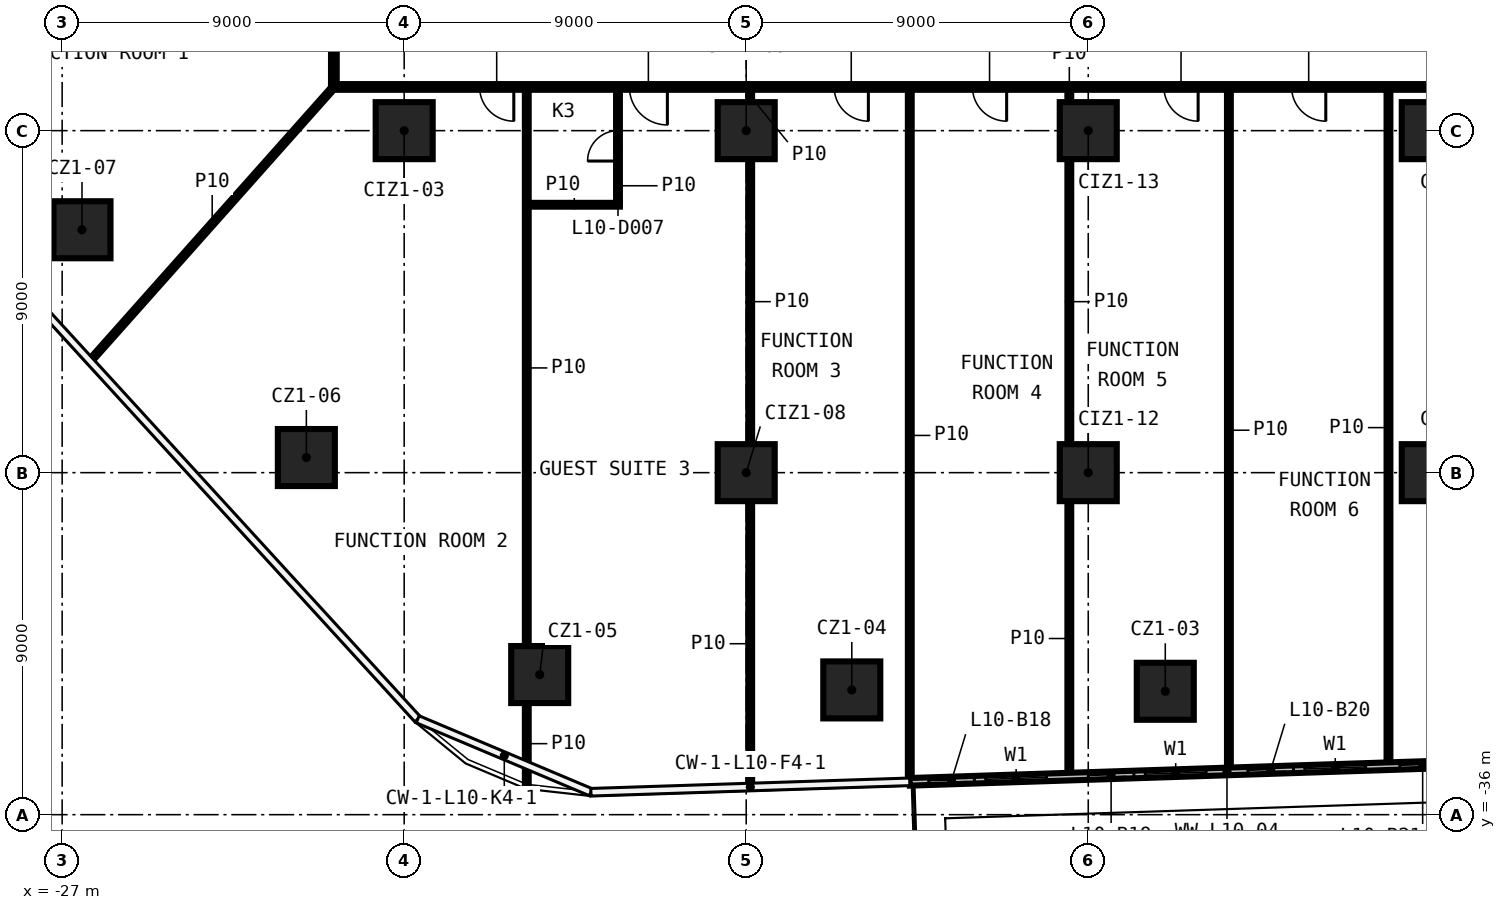
"""IFC4 building model, lengths in metres.
Left out: names, types, materials, properties, quantities, classifications, styles, units other than length and angle.
Written with IfcOpenShell. Run it as: python <this file> out.ifc"""

import sys

from ifc_helpers import new_model, si_unit, direction, frame, frame_2d, origin, origin_2d, place, context, subcontext, project, spatial, rectangle, extrude, element, fill, save


model = new_model("IFC4")
c1 = context("Model", 3, precision=1e-05, world=origin(), true_north=direction((0.0, 1.0)))
c2 = subcontext(c1, "Body", "Model", "MODEL_VIEW")
j1 = project(units=[si_unit("LENGTHUNIT", "METRE"), si_unit("PLANEANGLEUNIT", "RADIAN")], contexts=[c1])
p1 = place(None, origin())
s1 = spatial("IfcSite", under=j1, at=p1, CompositionType="ELEMENT")
p2 = place(p1, origin())
s2 = spatial("IfcBuilding", under=s1, at=p2, CompositionType="ELEMENT")
p3 = place(p2, frame((0.0, 0.0, 58.8)))
s3 = spatial("IfcBuildingStorey", under=s2, at=p3, CompositionType="ELEMENT", Elevation=58.8)
for number, where, z_axis, x_axis in (
    (1, (2.027, -32.753, 0.0), (0.0, 0.0, 1.0), (1.0, 0.0, 0.0)),
    (2, (-6.222, -32.717, 0.0), (0.0, 0.0, 1.0), (1.0, 0.0, 0.0)),
    (3, (-14.434, -32.313, 0.0), (0.0, 0.0, 1.0), (1.0, 0.0, 0.0)),
    (4, (-20.574, -26.602, 0.0), (0.0, 0.0, 1.0), (1.0, 0.0, 0.0)),
    (5, (-26.478, -20.608, 0.0), (0.0, 0.0, 1.0), (1.0, 0.0, 0.0)),
    (6, (-18.0, -18.0, 0.0), (0.0, 0.0, 1.0), (1.0, 0.0, 0.0)),
    (7, (-9.0, -27.0, 0.0), (0.0, 0.0, 1.0), (1.0, 0.0, 0.0)),
    (8, (-9.0, -18.0, 0.0), (0.0, 0.0, 1.0), (1.0, 0.0, 0.0)),
    (9, (0.0, -27.0, 0.0), (0.0, 0.0, 1.0), (1.0, 0.0, 0.0)),
    (10, (0.0, -18.0, 0.0), (0.0, 0.0, 1.0), (1.0, 0.0, 0.0)),
    (11, (9.0, -27.0, 0.0), (0.0, 0.0, 1.0), (1.0, 0.0, 0.0)),
    (12, (9.0, -18.0, 0.0), (0.0, 0.0, 1.0), (1.0, 0.0, 0.0)),
):
    element("IfcColumn", number, at=place(p3, frame(where, z_axis=z_axis, x_axis=x_axis)), inside=s3, PredefinedType="COLUMN", context=c2, shape_type="SweptSolid", body=[
        extrude(rectangle(XDim=1.5, YDim=1.5, at=origin_2d()), origin(), (0.0, 0.0, 1.0), 3.3),
    ])
p4 = place(p3, frame((-14.724, -19.95, 0.0), z_axis=(0.0, 0.0, 1.0), x_axis=(1.0, 0.0, 0.0)))
e13 = element("IfcWall", 13, at=p4, inside=s3, PredefinedType="PARTITIONING", context=c2, shape_type="SweptSolid", body=[
    extrude(rectangle(XDim=2.4, YDim=0.1, at=frame_2d((1.2, 0.0))), origin(), (0.0, 0.0, 1.0), 3.3),
])
p5 = place(p3, frame((19.925, -16.85, 0.0), z_axis=(0.0, 0.0, 1.0), x_axis=(-1.0, 0.0, 0.0)))
e14 = element("IfcWall", 14, at=p5, inside=s3, PredefinedType="PARTITIONING", context=c2, shape_type="SweptSolid", body=[
    extrude(rectangle(XDim=39.85, YDim=0.15, at=frame_2d((19.925, 0.0))), origin(), (0.0, 0.0, 1.0), 3.3),
])
p6 = place(p5, frame((35.041, 0.0, 0.0)))
e15 = element("IfcOpeningElement", 15, at=p6, cuts=e14, PredefinedType="OPENING", context=c2, shape_type="SweptSolid", body=[
    extrude(rectangle(XDim=0.9, YDim=2.1, at=frame_2d((0.45, 1.05))), frame((0.0, 0.085, 0.0), z_axis=(0.0, -1.0, 0.0), x_axis=(1.0, 0.0, 0.0)), (0.0, 0.0, 1.0), 0.17),
])
p7 = place(p5, frame((31.0, 0.0, 0.0)))
e16 = element("IfcOpeningElement", 16, at=p7, cuts=e14, PredefinedType="OPENING", context=c2, shape_type="SweptSolid", body=[
    extrude(rectangle(XDim=1.0, YDim=2.1, at=frame_2d((0.5, 1.05))), frame((0.0, 0.085, 0.0), z_axis=(0.0, -1.0, 0.0), x_axis=(1.0, 0.0, 0.0)), (0.0, 0.0, 1.0), 0.17),
])
p8 = place(p5, frame((25.711, 0.0, 0.0)))
e17 = element("IfcOpeningElement", 17, at=p8, cuts=e14, PredefinedType="OPENING", context=c2, shape_type="SweptSolid", body=[
    extrude(rectangle(XDim=0.9, YDim=2.1, at=frame_2d((0.45, 1.05))), frame((0.0, 0.085, 0.0), z_axis=(0.0, -1.0, 0.0), x_axis=(1.0, 0.0, 0.0)), (0.0, 0.0, 1.0), 0.17),
])
p9 = place(p5, frame((22.072, 0.0, 0.0)))
e18 = element("IfcOpeningElement", 18, at=p9, cuts=e14, PredefinedType="OPENING", context=c2, shape_type="SweptSolid", body=[
    extrude(rectangle(XDim=0.9, YDim=2.1, at=frame_2d((0.45, 1.05))), frame((0.0, 0.085, 0.0), z_axis=(0.0, -1.0, 0.0), x_axis=(1.0, 0.0, 0.0)), (0.0, 0.0, 1.0), 0.17),
])
p10 = place(p5, frame((17.034, 0.0, 0.0)))
e19 = element("IfcOpeningElement", 19, at=p10, cuts=e14, PredefinedType="OPENING", context=c2, shape_type="SweptSolid", body=[
    extrude(rectangle(XDim=0.9, YDim=2.1, at=frame_2d((0.45, 1.05))), frame((0.0, 0.085, 0.0), z_axis=(0.0, -1.0, 0.0), x_axis=(1.0, 0.0, 0.0)), (0.0, 0.0, 1.0), 0.17),
])
p11 = place(p5, frame((13.675, 0.0, 0.0)))
e20 = element("IfcOpeningElement", 20, at=p11, cuts=e14, PredefinedType="OPENING", context=c2, shape_type="SweptSolid", body=[
    extrude(rectangle(XDim=0.9, YDim=2.1, at=frame_2d((0.45, 1.05))), frame((0.0, 0.085, 0.0), z_axis=(0.0, -1.0, 0.0), x_axis=(1.0, 0.0, 0.0)), (0.0, 0.0, 1.0), 0.17),
])
p12 = place(p5, frame((4.031, 0.0, 0.0)))
e21 = element("IfcOpeningElement", 21, at=p12, cuts=e14, PredefinedType="OPENING", context=c2, shape_type="SweptSolid", body=[
    extrude(rectangle(XDim=1.0, YDim=2.1, at=frame_2d((0.5, 1.05))), frame((0.0, 0.085, 0.0), z_axis=(0.0, -1.0, 0.0), x_axis=(1.0, 0.0, 0.0)), (0.0, 0.0, 1.0), 0.17),
])
p13 = place(p3, frame((-26.253, -24.05, 0.0), z_axis=(0.0, 0.0, 1.0), x_axis=(0.66458555916, 0.747212175059, 0.0)))
e22 = element("IfcWall", 22, at=p13, inside=s3, PredefinedType="PARTITIONING", context=c2, shape_type="SweptSolid", body=[
    extrude(rectangle(XDim=9.635, YDim=0.1, at=frame_2d((4.818, 0.0))), origin(), (0.0, 0.0, 1.0), 3.3),
])
p14 = place(p3, frame((7.9, -34.704, 0.0), z_axis=(0.0, 0.0, 1.0), x_axis=(0.0, 1.0, 0.0)))
e23 = element("IfcWall", 23, at=p14, inside=s3, PredefinedType="PARTITIONING", context=c2, shape_type="SweptSolid", body=[
    extrude(rectangle(XDim=17.779, YDim=0.1, at=frame_2d((8.89, 0.0))), origin(), (0.0, 0.0, 1.0), 3.3),
])
p15 = place(p3, frame((3.701, -34.842, 0.0), z_axis=(0.0, 0.0, 1.0), x_axis=(0.0, 1.0, 0.0)))
e24 = element("IfcWall", 24, at=p15, inside=s3, PredefinedType="PARTITIONING", context=c2, shape_type="SweptSolid", body=[
    extrude(rectangle(XDim=17.917, YDim=0.1, at=frame_2d((8.958, 0.0))), origin(), (0.0, 0.0, 1.0), 3.3),
])
p16 = place(p3, frame((-0.498, -34.979, 0.0), z_axis=(0.0, 0.0, 1.0), x_axis=(0.0, 1.0, 0.0)))
e25 = element("IfcWall", 25, at=p16, inside=s3, PredefinedType="PARTITIONING", context=c2, shape_type="SweptSolid", body=[
    extrude(rectangle(XDim=7.229, YDim=0.1, at=frame_2d((3.614, 0.0))), origin(), (0.0, 0.0, 1.0), 3.3),
])
p17 = place(p3, frame((-0.498, -26.25, 0.0), z_axis=(0.0, 0.0, 1.0), x_axis=(0.0, 1.0, 0.0)))
e26 = element("IfcWall", 26, at=p17, inside=s3, PredefinedType="PARTITIONING", context=c2, shape_type="SweptSolid", body=[
    extrude(rectangle(XDim=7.5, YDim=0.1, at=frame_2d((3.75, 0.0))), origin(), (0.0, 0.0, 1.0), 3.3),
])
p18 = place(p3, frame((-0.498, -17.25, 0.0), z_axis=(0.0, 0.0, 1.0), x_axis=(0.0, 1.0, 0.0)))
e27 = element("IfcWall", 27, at=p18, inside=s3, PredefinedType="PARTITIONING", context=c2, shape_type="SweptSolid", body=[
    extrude(rectangle(XDim=0.325, YDim=0.1, at=frame_2d((0.163, 0.0))), origin(), (0.0, 0.0, 1.0), 3.3),
])
p19 = place(p3, frame((-4.696, -35.116, 0.0), z_axis=(0.0, 0.0, 1.0), x_axis=(0.0, 1.0, 0.0)))
e28 = element("IfcWall", 28, at=p19, inside=s3, PredefinedType="PARTITIONING", context=c2, shape_type="SweptSolid", body=[
    extrude(rectangle(XDim=18.191, YDim=0.1, at=frame_2d((9.095, 0.0))), origin(), (0.0, 0.0, 1.0), 3.3),
])
p20 = place(p3, frame((-8.895, -35.253, 0.0), z_axis=(0.0, 0.0, 1.0), x_axis=(0.0, 1.0, 0.0)))
e29 = element("IfcWall", 29, at=p20, inside=s3, PredefinedType="PARTITIONING", context=c2, shape_type="SweptSolid", body=[
    extrude(rectangle(XDim=7.503, YDim=0.1, at=frame_2d((3.751, 0.0))), origin(), (0.0, 0.0, 1.0), 3.3),
])
p21 = place(p3, frame((-8.895, -26.25, 0.0), z_axis=(0.0, 0.0, 1.0), x_axis=(0.0, 1.0, 0.0)))
e30 = element("IfcWall", 30, at=p21, inside=s3, PredefinedType="PARTITIONING", context=c2, shape_type="SweptSolid", body=[
    extrude(rectangle(XDim=7.5, YDim=0.1, at=frame_2d((3.75, 0.0))), origin(), (0.0, 0.0, 1.0), 3.3),
])
p22 = place(p3, frame((-8.895, -17.25, 0.0), z_axis=(0.0, 0.0, 1.0), x_axis=(0.0, 1.0, 0.0)))
e31 = element("IfcWall", 31, at=p22, inside=s3, PredefinedType="PARTITIONING", context=c2, shape_type="SweptSolid", body=[
    extrude(rectangle(XDim=0.325, YDim=0.1, at=frame_2d((0.163, 0.0))), origin(), (0.0, 0.0, 1.0), 3.3),
])
p23 = place(p3, frame((-12.374, -19.9, 0.0), z_axis=(0.0, 0.0, 1.0), x_axis=(0.0, 1.0, 0.0)))
e32 = element("IfcWall", 32, at=p23, inside=s3, PredefinedType="PARTITIONING", context=c2, shape_type="SweptSolid", body=[
    extrude(rectangle(XDim=2.975, YDim=0.1, at=frame_2d((1.487, 0.0))), origin(), (0.0, 0.0, 1.0), 3.3),
])
p24 = place(p23, frame((1.1, 0.0, 0.0)))
e33 = element("IfcOpeningElement", 33, at=p24, cuts=e32, PredefinedType="OPENING", context=c2, shape_type="SweptSolid", body=[
    extrude(rectangle(XDim=0.8, YDim=2.1, at=frame_2d((0.4, 1.05))), frame((0.0, 0.06, 0.0), z_axis=(0.0, -1.0, 0.0), x_axis=(1.0, 0.0, 0.0)), (0.0, 0.0, 1.0), 0.12),
])
p25 = place(p3, frame((-14.774, -35.2, 0.0), z_axis=(0.0, 0.0, 1.0), x_axis=(0.0, 1.0, 0.0)))
e34 = element("IfcWall", 34, at=p25, inside=s3, PredefinedType="PARTITIONING", context=c2, shape_type="SweptSolid", body=[
    extrude(rectangle(XDim=2.137, YDim=0.1, at=frame_2d((1.068, 0.0))), origin(), (0.0, 0.0, 1.0), 3.3),
])
p26 = place(p3, frame((-14.774, -31.563, 0.0), z_axis=(0.0, 0.0, 1.0), x_axis=(0.0, 1.0, 0.0)))
e35 = element("IfcWall", 35, at=p26, inside=s3, PredefinedType="PARTITIONING", context=c2, shape_type="SweptSolid", body=[
    extrude(rectangle(XDim=14.638, YDim=0.1, at=frame_2d((7.319, 0.0))), origin(), (0.0, 0.0, 1.0), 3.3),
])
p27 = place(p3, frame((-19.85, -16.775, 0.0), z_axis=(0.0, 0.0, 1.0), x_axis=(0.0, 1.0, 0.0)))
e36 = element("IfcWall", 36, at=p27, inside=s3, PredefinedType="PARTITIONING", context=c2, shape_type="SweptSolid", body=[
    extrude(rectangle(XDim=33.55, YDim=0.15, at=frame_2d((16.775, 0.0))), origin(), (0.0, 0.0, 1.0), 3.3),
])
p28 = place(p27, frame((12.083, 0.0, 0.0)))
e37 = element("IfcOpeningElement", 37, at=p28, cuts=e36, PredefinedType="OPENING", context=c2, shape_type="SweptSolid", body=[
    extrude(rectangle(XDim=1.0, YDim=2.1, at=frame_2d((0.5, 1.05))), frame((0.0, 0.085, 0.0), z_axis=(0.0, -1.0, 0.0), x_axis=(1.0, 0.0, 0.0)), (0.0, 0.0, 1.0), 0.17),
])
p29 = place(p27, frame((10.128, 0.0, 0.0)))
e38 = element("IfcOpeningElement", 38, at=p29, cuts=e36, PredefinedType="OPENING", context=c2, shape_type="SweptSolid", body=[
    extrude(rectangle(XDim=1.0, YDim=2.1, at=frame_2d((0.5, 1.05))), frame((0.0, 0.085, 0.0), z_axis=(0.0, -1.0, 0.0), x_axis=(1.0, 0.0, 0.0)), (0.0, 0.0, 1.0), 0.17),
])
p30 = place(p27, frame((3.259, 0.0, 0.0)))
e39 = element("IfcOpeningElement", 39, at=p30, cuts=e36, PredefinedType="OPENING", context=c2, shape_type="SweptSolid", body=[
    extrude(rectangle(XDim=0.9, YDim=2.1, at=frame_2d((0.45, 1.05))), frame((0.0, 0.085, 0.0), z_axis=(0.0, -1.0, 0.0), x_axis=(1.0, 0.0, 0.0)), (0.0, 0.0, 1.0), 0.17),
])
p31 = place(p27, frame((30.799, 0.0, 0.0)))
e40 = element("IfcOpeningElement", 40, at=p31, cuts=e36, PredefinedType="OPENING", context=c2, shape_type="SweptSolid", body=[
    extrude(rectangle(XDim=1.0, YDim=2.1, at=frame_2d((0.5, 1.05))), frame((0.0, 0.085, 0.0), z_axis=(0.0, -1.0, 0.0), x_axis=(1.0, 0.0, 0.0)), (0.0, 0.0, 1.0), 0.17),
])
p32 = place(p27, frame((22.638, 0.0, 0.0)))
e41 = element("IfcOpeningElement", 41, at=p32, cuts=e36, PredefinedType="OPENING", context=c2, shape_type="SweptSolid", body=[
    extrude(rectangle(XDim=1.0, YDim=2.1, at=frame_2d((0.5, 1.05))), frame((0.0, 0.085, 0.0), z_axis=(0.0, -1.0, 0.0), x_axis=(1.0, 0.0, 0.0)), (0.0, 0.0, 1.0), 0.17),
])
p33 = place(p27, frame((18.681, 0.0, 0.0)))
e42 = element("IfcOpeningElement", 42, at=p33, cuts=e36, PredefinedType="OPENING", context=c2, shape_type="SweptSolid", body=[
    extrude(rectangle(XDim=0.9, YDim=2.1, at=frame_2d((0.45, 1.05))), frame((0.0, 0.085, 0.0), z_axis=(0.0, -1.0, 0.0), x_axis=(1.0, 0.0, 0.0)), (0.0, 0.0, 1.0), 0.17),
])
p34 = place(p3, frame((-4.697, -35.136, 0.0), z_axis=(0.0, 0.0, 1.0), x_axis=(0.999466983916, 0.032645796998, 0.0)))
e43 = element("IfcWall", 43, at=p34, inside=s3, PredefinedType="SOLIDWALL", context=c2, shape_type="SweptSolid", body=[
    extrude(rectangle(XDim=16.804, YDim=0.2, at=frame_2d((8.402, 0.0))), origin(), (0.0, 0.0, 1.0), 3.3),
])
p35 = place(p34, frame((2.0, 0.0, 0.6)))
e44 = element("IfcOpeningElement", 44, at=p35, cuts=e43, PredefinedType="OPENING", context=c2, shape_type="SweptSolid", body=[
    extrude(rectangle(XDim=1.6, YDim=2.4, at=frame_2d((0.8, 1.2))), frame((0.0, 0.11, 0.0), z_axis=(0.0, -1.0, 0.0), x_axis=(1.0, 0.0, 0.0)), (0.0, 0.0, 1.0), 0.22),
])
p36 = place(p34, frame((0.5, 0.0, 0.0)))
e45 = element("IfcOpeningElement", 45, at=p36, cuts=e43, PredefinedType="OPENING", context=c2, shape_type="SweptSolid", body=[
    extrude(rectangle(XDim=1.2, YDim=2.4, at=frame_2d((0.6, 1.2))), frame((0.0, 0.11, 0.0), z_axis=(0.0, -1.0, 0.0), x_axis=(1.0, 0.0, 0.0)), (0.0, 0.0, 1.0), 0.22),
])
p37 = place(p34, frame((6.201, 0.0, 0.6)))
e46 = element("IfcOpeningElement", 46, at=p37, cuts=e43, PredefinedType="OPENING", context=c2, shape_type="SweptSolid", body=[
    extrude(rectangle(XDim=1.6, YDim=2.4, at=frame_2d((0.8, 1.2))), frame((0.0, 0.11, 0.0), z_axis=(0.0, -1.0, 0.0), x_axis=(1.0, 0.0, 0.0)), (0.0, 0.0, 1.0), 0.22),
])
p38 = place(p34, frame((4.701, 0.0, 0.0)))
e47 = element("IfcOpeningElement", 47, at=p38, cuts=e43, PredefinedType="OPENING", context=c2, shape_type="SweptSolid", body=[
    extrude(rectangle(XDim=1.2, YDim=2.4, at=frame_2d((0.6, 1.2))), frame((0.0, 0.11, 0.0), z_axis=(0.0, -1.0, 0.0), x_axis=(1.0, 0.0, 0.0)), (0.0, 0.0, 1.0), 0.22),
])
p39 = place(p34, frame((10.402, 0.0, 0.6)))
e48 = element("IfcOpeningElement", 48, at=p39, cuts=e43, PredefinedType="OPENING", context=c2, shape_type="SweptSolid", body=[
    extrude(rectangle(XDim=1.6, YDim=2.4, at=frame_2d((0.8, 1.2))), frame((0.0, 0.11, 0.0), z_axis=(0.0, -1.0, 0.0), x_axis=(1.0, 0.0, 0.0)), (0.0, 0.0, 1.0), 0.22),
])
p40 = place(p34, frame((8.902, 0.0, 0.0)))
e49 = element("IfcOpeningElement", 49, at=p40, cuts=e43, PredefinedType="OPENING", context=c2, shape_type="SweptSolid", body=[
    extrude(rectangle(XDim=1.2, YDim=2.4, at=frame_2d((0.6, 1.2))), frame((0.0, 0.11, 0.0), z_axis=(0.0, -1.0, 0.0), x_axis=(1.0, 0.0, 0.0)), (0.0, 0.0, 1.0), 0.22),
])
p41 = place(p34, frame((14.603, 0.0, 0.6)))
e50 = element("IfcOpeningElement", 50, at=p41, cuts=e43, PredefinedType="OPENING", context=c2, shape_type="SweptSolid", body=[
    extrude(rectangle(XDim=1.6, YDim=2.4, at=frame_2d((0.8, 1.2))), frame((0.0, 0.11, 0.0), z_axis=(0.0, -1.0, 0.0), x_axis=(1.0, 0.0, 0.0)), (0.0, 0.0, 1.0), 0.22),
])
p42 = place(p34, frame((12.903, 0.0, 0.0)))
e51 = element("IfcOpeningElement", 51, at=p42, cuts=e43, PredefinedType="OPENING", context=c2, shape_type="SweptSolid", body=[
    extrude(rectangle(XDim=1.2, YDim=2.4, at=frame_2d((0.6, 1.2))), frame((0.0, 0.11, 0.0), z_axis=(0.0, -1.0, 0.0), x_axis=(1.0, 0.0, 0.0)), (0.0, 0.0, 1.0), 0.22),
])
p43 = place(p6, origin())
e52 = element("IfcDoor", 52, at=p43, inside=s3, OperationType="SINGLE_SWING_LEFT", PredefinedType="DOOR", context=c2, shape_type="SweptSolid", body=[
    extrude(rectangle(XDim=0.9, YDim=2.1, at=frame_2d((0.45, 1.05))), frame((0.0, 0.025, 0.0), z_axis=(0.0, -1.0, 0.0), x_axis=(1.0, 0.0, 0.0)), (0.0, 0.0, 1.0), 0.05),
])
fill(e15, e52)
p44 = place(p24, origin())
e53 = element("IfcDoor", 53, at=p44, inside=s3, OperationType="SINGLE_SWING_LEFT", PredefinedType="DOOR", context=c2, shape_type="SweptSolid", body=[
    extrude(rectangle(XDim=0.8, YDim=2.1, at=frame_2d((0.4, 1.05))), frame((0.0, 0.025, 0.0), z_axis=(0.0, -1.0, 0.0), x_axis=(1.0, 0.0, 0.0)), (0.0, 0.0, 1.0), 0.05),
])
fill(e33, e53)
p45 = place(p7, origin())
e54 = element("IfcDoor", 54, at=p45, inside=s3, OperationType="SINGLE_SWING_RIGHT", PredefinedType="DOOR", context=c2, shape_type="SweptSolid", body=[
    extrude(rectangle(XDim=1.0, YDim=2.1, at=frame_2d((0.5, 1.05))), frame((0.0, 0.025, 0.0), z_axis=(0.0, -1.0, 0.0), x_axis=(1.0, 0.0, 0.0)), (0.0, 0.0, 1.0), 0.05),
])
fill(e16, e54)
p46 = place(p8, origin())
e55 = element("IfcDoor", 55, at=p46, inside=s3, OperationType="SINGLE_SWING_LEFT", PredefinedType="DOOR", context=c2, shape_type="SweptSolid", body=[
    extrude(rectangle(XDim=0.9, YDim=2.1, at=frame_2d((0.45, 1.05))), frame((0.0, 0.025, 0.0), z_axis=(0.0, -1.0, 0.0), x_axis=(1.0, 0.0, 0.0)), (0.0, 0.0, 1.0), 0.05),
])
fill(e17, e55)
p47 = place(p9, origin())
e56 = element("IfcDoor", 56, at=p47, inside=s3, OperationType="SINGLE_SWING_RIGHT", PredefinedType="DOOR", context=c2, shape_type="SweptSolid", body=[
    extrude(rectangle(XDim=0.9, YDim=2.1, at=frame_2d((0.45, 1.05))), frame((0.0, 0.025, 0.0), z_axis=(0.0, -1.0, 0.0), x_axis=(1.0, 0.0, 0.0)), (0.0, 0.0, 1.0), 0.05),
])
fill(e18, e56)
p48 = place(p10, origin())
e57 = element("IfcDoor", 57, at=p48, inside=s3, OperationType="SINGLE_SWING_LEFT", PredefinedType="DOOR", context=c2, shape_type="SweptSolid", body=[
    extrude(rectangle(XDim=0.9, YDim=2.1, at=frame_2d((0.45, 1.05))), frame((0.0, 0.025, 0.0), z_axis=(0.0, -1.0, 0.0), x_axis=(1.0, 0.0, 0.0)), (0.0, 0.0, 1.0), 0.05),
])
fill(e19, e57)
p49 = place(p11, origin())
e58 = element("IfcDoor", 58, at=p49, inside=s3, OperationType="SINGLE_SWING_RIGHT", PredefinedType="DOOR", context=c2, shape_type="SweptSolid", body=[
    extrude(rectangle(XDim=0.9, YDim=2.1, at=frame_2d((0.45, 1.05))), frame((0.0, 0.025, 0.0), z_axis=(0.0, -1.0, 0.0), x_axis=(1.0, 0.0, 0.0)), (0.0, 0.0, 1.0), 0.05),
])
fill(e20, e58)
p50 = place(p35, origin())
e59 = element("IfcWindow", 59, at=p50, inside=s3, PartitioningType="SINGLE_PANEL", PredefinedType="WINDOW", context=c2, shape_type="SweptSolid", body=[
    extrude(rectangle(XDim=1.6, YDim=2.4, at=frame_2d((0.8, 1.2))), frame((0.0, 0.03, 0.0), z_axis=(0.0, -1.0, 0.0), x_axis=(1.0, 0.0, 0.0)), (0.0, 0.0, 1.0), 0.06),
])
fill(e44, e59)
p51 = place(p36, origin())
e60 = element("IfcDoor", 60, at=p51, inside=s3, OperationType="SLIDING_TO_LEFT", PredefinedType="DOOR", context=c2, shape_type="SweptSolid", body=[
    extrude(rectangle(XDim=1.2, YDim=2.4, at=frame_2d((0.6, 1.2))), frame((0.0, 0.025, 0.0), z_axis=(0.0, -1.0, 0.0), x_axis=(1.0, 0.0, 0.0)), (0.0, 0.0, 1.0), 0.05),
])
fill(e45, e60)
p52 = place(p37, origin())
e61 = element("IfcWindow", 61, at=p52, inside=s3, PartitioningType="SINGLE_PANEL", PredefinedType="WINDOW", context=c2, shape_type="SweptSolid", body=[
    extrude(rectangle(XDim=1.6, YDim=2.4, at=frame_2d((0.8, 1.2))), frame((0.0, 0.03, 0.0), z_axis=(0.0, -1.0, 0.0), x_axis=(1.0, 0.0, 0.0)), (0.0, 0.0, 1.0), 0.06),
])
fill(e46, e61)
p53 = place(p38, origin())
e62 = element("IfcDoor", 62, at=p53, inside=s3, OperationType="SLIDING_TO_LEFT", PredefinedType="DOOR", context=c2, shape_type="SweptSolid", body=[
    extrude(rectangle(XDim=1.2, YDim=2.4, at=frame_2d((0.6, 1.2))), frame((0.0, 0.025, 0.0), z_axis=(0.0, -1.0, 0.0), x_axis=(1.0, 0.0, 0.0)), (0.0, 0.0, 1.0), 0.05),
])
fill(e47, e62)
p54 = place(p39, origin())
e63 = element("IfcWindow", 63, at=p54, inside=s3, PartitioningType="SINGLE_PANEL", PredefinedType="WINDOW", context=c2, shape_type="SweptSolid", body=[
    extrude(rectangle(XDim=1.6, YDim=2.4, at=frame_2d((0.8, 1.2))), frame((0.0, 0.03, 0.0), z_axis=(0.0, -1.0, 0.0), x_axis=(1.0, 0.0, 0.0)), (0.0, 0.0, 1.0), 0.06),
])
fill(e48, e63)
p55 = place(p40, origin())
e64 = element("IfcDoor", 64, at=p55, inside=s3, OperationType="SLIDING_TO_LEFT", PredefinedType="DOOR", context=c2, shape_type="SweptSolid", body=[
    extrude(rectangle(XDim=1.2, YDim=2.4, at=frame_2d((0.6, 1.2))), frame((0.0, 0.025, 0.0), z_axis=(0.0, -1.0, 0.0), x_axis=(1.0, 0.0, 0.0)), (0.0, 0.0, 1.0), 0.05),
])
fill(e49, e64)
p56 = place(p42, origin())
e65 = element("IfcDoor", 65, at=p56, inside=s3, OperationType="SLIDING_TO_LEFT", PredefinedType="DOOR", context=c2, shape_type="SweptSolid", body=[
    extrude(rectangle(XDim=1.2, YDim=2.4, at=frame_2d((0.6, 1.2))), frame((0.0, 0.025, 0.0), z_axis=(0.0, -1.0, 0.0), x_axis=(1.0, 0.0, 0.0)), (0.0, 0.0, 1.0), 0.05),
])
fill(e51, e65)
save(model, sys.argv[1])
